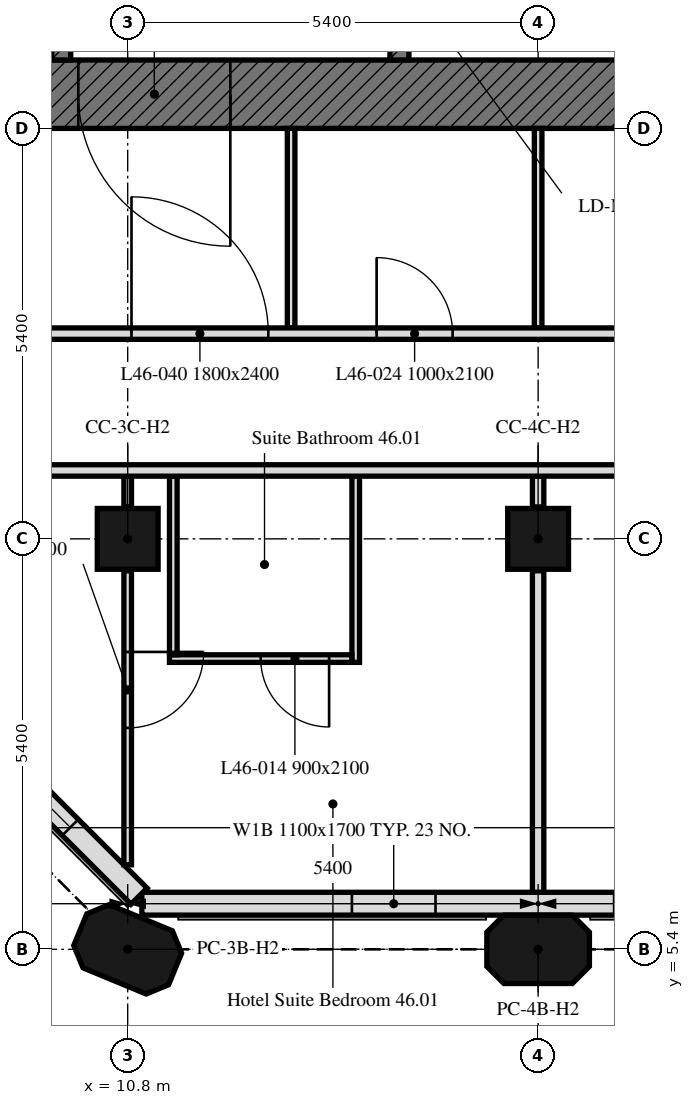
"""IFC4 building model, lengths in metres.
Left out: names, types, materials, properties, quantities, classifications, styles, units other than length and angle.
Written with IfcOpenShell. Run it as: python <this file> out.ifc"""

import sys

from ifc_helpers import new_model, si_unit, direction, frame, frame_2d, origin, origin_2d, place, context, subcontext, project, spatial, polyline, rectangle, outline, extrude, element, fill, save


model = new_model("IFC4")
c1 = context("Model", 3, precision=1e-05, world=origin(), true_north=direction((0.0, 1.0)))
c2 = subcontext(c1, "Body", "Model", "MODEL_VIEW")
j1 = project(units=[si_unit("LENGTHUNIT", "METRE"), si_unit("PLANEANGLEUNIT", "RADIAN")], contexts=[c1])
p1 = place(None, origin())
s1 = spatial("IfcSite", under=j1, at=p1, CompositionType="ELEMENT")
p2 = place(p1, origin())
s2 = spatial("IfcBuilding", under=s1, at=p2, CompositionType="ELEMENT")
p3 = place(p2, frame((0.0, 0.0, 190.6)))
s3 = spatial("IfcBuildingStorey", under=s2, at=p3, CompositionType="ELEMENT", Elevation=190.6)
for number, where, z_axis, x_axis in (
    (1, (10.8, 5.4, 0.0), (0.0, 0.0, 1.0), (-0.924, 0.383, 0.0)),
    (2, (16.2, 5.4, 0.0), (0.0, 0.0, 1.0), (1.0, 0.0, 0.0)),
):
    element("IfcColumn", number, at=place(p3, frame(where, z_axis=z_axis, x_axis=x_axis)), inside=s3, PredefinedType="COLUMN", context=c2, shape_type="SweptSolid", body=[
        extrude(outline(polyline([(-0.45, -0.45), (0.45, -0.45), (0.675, -0.225), (0.675, 0.225), (0.45, 0.45), (-0.45, 0.45), (-0.675, 0.225), (-0.675, -0.225), (-0.45, -0.45)])), origin(), (0.0, 0.0, 1.0), 3.0),
    ])
for number, where, z_axis, x_axis in (
    (3, (10.8, 10.8, 0.0), (0.0, 0.0, 1.0), (1.0, 0.0, 0.0)),
    (4, (16.2, 10.8, 0.0), (0.0, 0.0, 1.0), (1.0, 0.0, 0.0)),
):
    element("IfcColumn", number, at=place(p3, frame(where, z_axis=z_axis, x_axis=x_axis)), inside=s3, PredefinedType="COLUMN", context=c2, shape_type="SweptSolid", body=[
        extrude(rectangle(XDim=0.8, YDim=0.8, at=origin_2d()), origin(), (0.0, 0.0, 1.0), 3.0),
    ])
p4 = place(p3, frame((10.986, 6.0, 0.0), z_axis=(0.0, 0.0, 1.0), x_axis=(1.0, 0.0, 0.0)))
e5 = element("IfcWall", 5, at=p4, inside=s3, PredefinedType="SOLIDWALL", context=c2, shape_type="SweptSolid", body=[
    extrude(rectangle(XDim=32.027, YDim=0.3, at=frame_2d((16.014, 0.0))), origin(), (0.0, 0.0, 1.0), 3.0),
])
p5 = place(p4, frame((2.764, 0.0, 0.9)))
e6 = element("IfcOpeningElement", 6, at=p5, cuts=e5, PredefinedType="OPENING", context=c2, shape_type="SweptSolid", body=[
    extrude(rectangle(XDim=1.1, YDim=1.7, at=frame_2d((0.55, 0.85))), frame((0.0, 0.16, 0.0), z_axis=(0.0, -1.0, 0.0), x_axis=(1.0, 0.0, 0.0)), (0.0, 0.0, 1.0), 0.32),
])
p6 = place(p4, frame((6.214, 0.0, 0.9)))
e7 = element("IfcOpeningElement", 7, at=p6, cuts=e5, PredefinedType="OPENING", context=c2, shape_type="SweptSolid", body=[
    extrude(rectangle(XDim=3.4, YDim=1.7, at=frame_2d((1.7, 0.85))), frame((0.0, 0.16, 0.0), z_axis=(0.0, -1.0, 0.0), x_axis=(1.0, 0.0, 0.0)), (0.0, 0.0, 1.0), 0.32),
])
p7 = place(p4, frame((13.564, 0.0, 0.9)))
e8 = element("IfcOpeningElement", 8, at=p7, cuts=e5, PredefinedType="OPENING", context=c2, shape_type="SweptSolid", body=[
    extrude(rectangle(XDim=1.1, YDim=1.7, at=frame_2d((0.55, 0.85))), frame((0.0, 0.16, 0.0), z_axis=(0.0, -1.0, 0.0), x_axis=(1.0, 0.0, 0.0)), (0.0, 0.0, 1.0), 0.32),
])
p8 = place(p4, frame((17.014, 0.0, 0.9)))
e9 = element("IfcOpeningElement", 9, at=p8, cuts=e5, PredefinedType="OPENING", context=c2, shape_type="SweptSolid", body=[
    extrude(rectangle(XDim=3.4, YDim=1.7, at=frame_2d((1.7, 0.85))), frame((0.0, 0.16, 0.0), z_axis=(0.0, -1.0, 0.0), x_axis=(1.0, 0.0, 0.0)), (0.0, 0.0, 1.0), 0.32),
])
p9 = place(p4, frame((24.364, 0.0, 0.9)))
e10 = element("IfcOpeningElement", 10, at=p9, cuts=e5, PredefinedType="OPENING", context=c2, shape_type="SweptSolid", body=[
    extrude(rectangle(XDim=1.1, YDim=1.7, at=frame_2d((0.55, 0.85))), frame((0.0, 0.16, 0.0), z_axis=(0.0, -1.0, 0.0), x_axis=(1.0, 0.0, 0.0)), (0.0, 0.0, 1.0), 0.32),
])
p10 = place(p4, frame((27.814, 0.0, 0.9)))
e11 = element("IfcOpeningElement", 11, at=p10, cuts=e5, PredefinedType="OPENING", context=c2, shape_type="SweptSolid", body=[
    extrude(rectangle(XDim=3.4, YDim=1.7, at=frame_2d((1.7, 0.85))), frame((0.0, 0.16, 0.0), z_axis=(0.0, -1.0, 0.0), x_axis=(1.0, 0.0, 0.0)), (0.0, 0.0, 1.0), 0.32),
])
p11 = place(p3, frame((6.099, 10.949, 0.0), z_axis=(0.0, 0.0, 1.0), x_axis=(0.707106781187, -0.707106781187, 0.0)))
e12 = element("IfcWall", 12, at=p11, inside=s3, PredefinedType="SOLIDWALL", context=c2, shape_type="SweptSolid", body=[
    extrude(rectangle(XDim=6.86, YDim=0.3, at=frame_2d((3.43, 0.0))), origin(), (0.0, 0.0, 1.0), 3.0),
])
p12 = place(p11, frame((1.28, 0.0, 0.9)))
e13 = element("IfcOpeningElement", 13, at=p12, cuts=e12, PredefinedType="OPENING", context=c2, shape_type="SweptSolid", body=[
    extrude(rectangle(XDim=1.1, YDim=1.7, at=frame_2d((0.55, 0.85))), frame((0.0, 0.16, 0.0), z_axis=(0.0, -1.0, 0.0), x_axis=(1.0, 0.0, 0.0)), (0.0, 0.0, 1.0), 0.32),
])
p13 = place(p11, frame((4.48, 0.0, 0.9)))
e14 = element("IfcOpeningElement", 14, at=p13, cuts=e12, PredefinedType="OPENING", context=c2, shape_type="SweptSolid", body=[
    extrude(rectangle(XDim=1.1, YDim=1.7, at=frame_2d((0.55, 0.85))), frame((0.0, 0.16, 0.0), z_axis=(0.0, -1.0, 0.0), x_axis=(1.0, 0.0, 0.0)), (0.0, 0.0, 1.0), 0.32),
])
p14 = place(p3, frame((17.7, 16.65, 0.0), z_axis=(0.0, 0.0, 1.0), x_axis=(-1.0, 0.0, 0.0)))
e15 = element("IfcWall", 15, at=p14, inside=s3, PredefinedType="SOLIDWALL", context=c2, shape_type="SweptSolid", body=[
    extrude(rectangle(XDim=11.1, YDim=0.9, at=frame_2d((5.55, 0.0))), origin(), (0.0, 0.0, 1.0), 3.0),
])
p15 = place(p14, frame((5.55, 0.0, 0.0)))
e16 = element("IfcOpeningElement", 16, at=p15, cuts=e15, PredefinedType="OPENING", context=c2, shape_type="SweptSolid", body=[
    extrude(rectangle(XDim=2.0, YDim=2.4, at=frame_2d((1.0, 1.2))), frame((0.0, 0.45, 0.0), z_axis=(0.0, -1.0, 0.0), x_axis=(1.0, 0.0, 0.0)), (0.0, 0.0, 1.0), 0.9),
])
p16 = place(p3, frame((9.925, 17.1, 0.0), z_axis=(0.0, 0.0, 1.0), x_axis=(0.0, 1.0, 0.0)))
e17 = element("IfcWall", 17, at=p16, inside=s3, PredefinedType="SOLIDWALL", context=c2, shape_type="SweptSolid", body=[
    extrude(rectangle(XDim=14.4, YDim=0.25, at=frame_2d((7.2, 0.0))), origin(), (0.0, 0.0, 1.0), 3.0),
])
p17 = place(p16, frame((4.6, 0.0, 0.0)))
e18 = element("IfcOpeningElement", 18, at=p17, cuts=e17, PredefinedType="OPENING", context=c2, shape_type="SweptSolid", body=[
    extrude(rectangle(XDim=1.0, YDim=2.1, at=frame_2d((0.5, 1.05))), frame((0.0, 0.125, 0.0), z_axis=(0.0, -1.0, 0.0), x_axis=(1.0, 0.0, 0.0)), (0.0, 0.0, 1.0), 0.25),
])
p18 = place(p16, frame((7.062, 0.0, 0.0)))
e19 = element("IfcOpeningElement", 19, at=p18, cuts=e17, PredefinedType="OPENING", context=c2, shape_type="SweptSolid", body=[
    extrude(rectangle(XDim=1.2, YDim=2.1, at=frame_2d((0.6, 1.05))), frame((0.0, 0.125, 0.0), z_axis=(0.0, -1.0, 0.0), x_axis=(1.0, 0.0, 0.0)), (0.0, 0.0, 1.0), 0.25),
])
p19 = place(p16, frame((9.726, 0.0, 0.0)))
e20 = element("IfcOpeningElement", 20, at=p19, cuts=e17, PredefinedType="OPENING", context=c2, shape_type="SweptSolid", body=[
    extrude(rectangle(XDim=0.9, YDim=2.1, at=frame_2d((0.45, 1.05))), frame((0.0, 0.125, 0.0), z_axis=(0.0, -1.0, 0.0), x_axis=(1.0, 0.0, 0.0)), (0.0, 0.0, 1.0), 0.25),
])
p20 = place(p16, frame((11.539, 0.0, 0.0)))
e21 = element("IfcOpeningElement", 21, at=p20, cuts=e17, PredefinedType="OPENING", context=c2, shape_type="SweptSolid", body=[
    extrude(rectangle(XDim=0.9, YDim=2.1, at=frame_2d((0.45, 1.05))), frame((0.0, 0.125, 0.0), z_axis=(0.0, -1.0, 0.0), x_axis=(1.0, 0.0, 0.0)), (0.0, 0.0, 1.0), 0.25),
])
p21 = place(p16, frame((13.226, 0.0, 0.0)))
e22 = element("IfcOpeningElement", 22, at=p21, cuts=e17, PredefinedType="OPENING", context=c2, shape_type="SweptSolid", body=[
    extrude(rectangle(XDim=0.9, YDim=2.1, at=frame_2d((0.45, 1.05))), frame((0.0, 0.125, 0.0), z_axis=(0.0, -1.0, 0.0), x_axis=(1.0, 0.0, 0.0)), (0.0, 0.0, 1.0), 0.25),
])
p22 = place(p3, frame((14.375, 17.1, 0.0), z_axis=(0.0, 0.0, 1.0), x_axis=(0.0, 1.0, 0.0)))
e23 = element("IfcWall", 23, at=p22, inside=s3, PredefinedType="SOLIDWALL", context=c2, shape_type="SweptSolid", body=[
    extrude(rectangle(XDim=14.4, YDim=0.25, at=frame_2d((7.2, 0.0))), origin(), (0.0, 0.0, 1.0), 3.0),
])
p23 = place(p22, frame((13.15, 0.0, 0.0)))
e24 = element("IfcOpeningElement", 24, at=p23, cuts=e23, PredefinedType="OPENING", context=c2, shape_type="SweptSolid", body=[
    extrude(rectangle(XDim=1.0, YDim=2.1, at=frame_2d((0.5, 1.05))), frame((0.0, 0.125, 0.0), z_axis=(0.0, -1.0, 0.0), x_axis=(1.0, 0.0, 0.0)), (0.0, 0.0, 1.0), 0.25),
])
p24 = place(p22, frame((0.6, 0.0, 0.0)))
e25 = element("IfcOpeningElement", 25, at=p24, cuts=e23, PredefinedType="OPENING", context=c2, shape_type="SweptSolid", body=[
    extrude(rectangle(XDim=1.1, YDim=2.1, at=frame_2d((0.55, 1.05))), frame((0.0, 0.125, 0.0), z_axis=(0.0, -1.0, 0.0), x_axis=(1.0, 0.0, 0.0)), (0.0, 0.0, 1.0), 0.25),
])
p25 = place(p22, frame((3.25, 0.0, 0.0)))
e26 = element("IfcOpeningElement", 26, at=p25, cuts=e23, PredefinedType="OPENING", context=c2, shape_type="SweptSolid", body=[
    extrude(rectangle(XDim=0.9, YDim=2.1, at=frame_2d((0.45, 1.05))), frame((0.0, 0.125, 0.0), z_axis=(0.0, -1.0, 0.0), x_axis=(1.0, 0.0, 0.0)), (0.0, 0.0, 1.0), 0.25),
])
p26 = place(p3, frame((16.2, 6.151, 0.0), z_axis=(0.0, 0.0, 1.0), x_axis=(0.0, 1.0, 0.0)))
e27 = element("IfcWall", 27, at=p26, inside=s3, PredefinedType="PARTITIONING", context=c2, shape_type="SweptSolid", body=[
    extrude(rectangle(XDim=4.229, YDim=0.15, at=frame_2d((2.115, 0.0))), origin(), (0.0, 0.0, 1.0), 3.0),
])
p27 = place(p3, frame((16.2, 11.22, 0.0), z_axis=(0.0, 0.0, 1.0), x_axis=(0.0, 1.0, 0.0)))
e28 = element("IfcWall", 28, at=p27, inside=s3, PredefinedType="PARTITIONING", context=c2, shape_type="SweptSolid", body=[
    extrude(rectangle(XDim=0.405, YDim=0.15, at=frame_2d((0.203, 0.0))), origin(), (0.0, 0.0, 1.0), 3.0),
])
p28 = place(p3, frame((13.8, 11.625, 0.0), z_axis=(0.0, 0.0, 1.0), x_axis=(0.0, -1.0, 0.0)))
e29 = element("IfcWall", 29, at=p28, inside=s3, PredefinedType="PARTITIONING", context=c2, shape_type="SweptSolid", body=[
    extrude(rectangle(XDim=2.45, YDim=0.1, at=frame_2d((1.225, 0.0))), origin(), (0.0, 0.0, 1.0), 3.0),
])
p29 = place(p3, frame((13.75, 9.225, 0.0), z_axis=(0.0, 0.0, 1.0), x_axis=(-1.0, 0.0, 0.0)))
e30 = element("IfcWall", 30, at=p29, inside=s3, PredefinedType="PARTITIONING", context=c2, shape_type="SweptSolid", body=[
    extrude(rectangle(XDim=2.4, YDim=0.1, at=frame_2d((1.2, 0.0))), origin(), (0.0, 0.0, 1.0), 3.0),
])
p30 = place(p29, frame((0.3, 0.0, 0.0)))
e31 = element("IfcOpeningElement", 31, at=p30, cuts=e30, PredefinedType="OPENING", context=c2, shape_type="SweptSolid", body=[
    extrude(rectangle(XDim=0.9, YDim=2.1, at=frame_2d((0.45, 1.05))), frame((0.0, 0.05, 0.0), z_axis=(0.0, -1.0, 0.0), x_axis=(1.0, 0.0, 0.0)), (0.0, 0.0, 1.0), 0.1),
])
p31 = place(p3, frame((11.4, 9.275, 0.0), z_axis=(0.0, 0.0, 1.0), x_axis=(0.0, 1.0, 0.0)))
e32 = element("IfcWall", 32, at=p31, inside=s3, PredefinedType="PARTITIONING", context=c2, shape_type="SweptSolid", body=[
    extrude(rectangle(XDim=2.35, YDim=0.1, at=frame_2d((1.175, 0.0))), origin(), (0.0, 0.0, 1.0), 3.0),
])
p32 = place(p3, frame((10.8, 11.625, 0.0), z_axis=(0.0, 0.0, 1.0), x_axis=(0.0, -1.0, 0.0)))
e33 = element("IfcWall", 33, at=p32, inside=s3, PredefinedType="PARTITIONING", context=c2, shape_type="SweptSolid", body=[
    extrude(rectangle(XDim=0.405, YDim=0.1, at=frame_2d((0.203, 0.0))), origin(), (0.0, 0.0, 1.0), 3.0),
])
p33 = place(p3, frame((10.8, 10.38, 0.0), z_axis=(0.0, 0.0, 1.0), x_axis=(0.0, -1.0, 0.0)))
e34 = element("IfcWall", 34, at=p33, inside=s3, PredefinedType="PARTITIONING", context=c2, shape_type="SweptSolid", body=[
    extrude(rectangle(XDim=3.868, YDim=0.1, at=frame_2d((1.934, 0.0))), origin(), (0.0, 0.0, 1.0), 3.0),
])
p34 = place(p33, frame((1.067, 0.0, 0.0)))
e35 = element("IfcOpeningElement", 35, at=p34, cuts=e34, PredefinedType="OPENING", context=c2, shape_type="SweptSolid", body=[
    extrude(rectangle(XDim=1.0, YDim=2.1, at=frame_2d((0.5, 1.05))), frame((0.0, 0.05, 0.0), z_axis=(0.0, -1.0, 0.0), x_axis=(1.0, 0.0, 0.0)), (0.0, 0.0, 1.0), 0.1),
])
p35 = place(p3, frame((6.151, 11.7, 0.0), z_axis=(0.0, 0.0, 1.0), x_axis=(1.0, 0.0, 0.0)))
e36 = element("IfcWall", 36, at=p35, inside=s3, PredefinedType="PARTITIONING", context=c2, shape_type="SweptSolid", body=[
    extrude(rectangle(XDim=41.698, YDim=0.15, at=frame_2d((20.849, 0.0))), origin(), (0.0, 0.0, 1.0), 3.0),
])
p36 = place(p35, frame((17.649, 0.0, 0.0)))
e37 = element("IfcOpeningElement", 37, at=p36, cuts=e36, PredefinedType="OPENING", context=c2, shape_type="SweptSolid", body=[
    extrude(rectangle(XDim=1.0, YDim=2.1, at=frame_2d((0.5, 1.05))), frame((0.0, 0.075, 0.0), z_axis=(0.0, -1.0, 0.0), x_axis=(1.0, 0.0, 0.0)), (0.0, 0.0, 1.0), 0.15),
])
p37 = place(p35, frame((1.449, 0.0, 0.0)))
e38 = element("IfcOpeningElement", 38, at=p37, cuts=e36, PredefinedType="OPENING", context=c2, shape_type="SweptSolid", body=[
    extrude(rectangle(XDim=1.0, YDim=2.1, at=frame_2d((0.5, 1.05))), frame((0.0, 0.075, 0.0), z_axis=(0.0, -1.0, 0.0), x_axis=(1.0, 0.0, 0.0)), (0.0, 0.0, 1.0), 0.15),
])
p38 = place(p35, frame((29.249, 0.0, 0.0)))
e39 = element("IfcOpeningElement", 39, at=p38, cuts=e36, PredefinedType="OPENING", context=c2, shape_type="SweptSolid", body=[
    extrude(rectangle(XDim=1.0, YDim=2.1, at=frame_2d((0.5, 1.05))), frame((0.0, 0.075, 0.0), z_axis=(0.0, -1.0, 0.0), x_axis=(1.0, 0.0, 0.0)), (0.0, 0.0, 1.0), 0.15),
])
p39 = place(p35, frame((37.954, 0.0, 0.0)))
e40 = element("IfcOpeningElement", 40, at=p39, cuts=e36, PredefinedType="OPENING", context=c2, shape_type="SweptSolid", body=[
    extrude(rectangle(XDim=1.0, YDim=2.1, at=frame_2d((0.5, 1.05))), frame((0.0, 0.075, 0.0), z_axis=(0.0, -1.0, 0.0), x_axis=(1.0, 0.0, 0.0)), (0.0, 0.0, 1.0), 0.15),
])
for number, where, z_axis, x_axis in (
    (41, (16.2, 16.2, 0.0), (0.0, 0.0, 1.0), (0.0, -1.0, 0.0)),
    (42, (12.95, 13.575, 0.0), (0.0, 0.0, 1.0), (0.0, 1.0, 0.0)),
):
    element("IfcWall", number, at=place(p3, frame(where, z_axis=z_axis, x_axis=x_axis)), inside=s3, PredefinedType="PARTITIONING", context=c2, shape_type="SweptSolid", body=[
        extrude(rectangle(XDim=2.625, YDim=0.1, at=frame_2d((1.312, 0.0))), origin(), (0.0, 0.0, 1.0), 3.0),
    ])
p40 = place(p3, frame((9.45, 13.5, 0.0), z_axis=(0.0, 0.0, 1.0), x_axis=(1.0, 0.0, 0.0)))
e43 = element("IfcWall", 43, at=p40, inside=s3, PredefinedType="PARTITIONING", context=c2, shape_type="SweptSolid", body=[
    extrude(rectangle(XDim=33.675, YDim=0.15, at=frame_2d((16.837, 0.0))), origin(), (0.0, 0.0, 1.0), 3.0),
])
p41 = place(p40, frame((8.95, 0.0, 0.0)))
e44 = element("IfcOpeningElement", 44, at=p41, cuts=e43, PredefinedType="OPENING", context=c2, shape_type="SweptSolid", body=[
    extrude(rectangle(XDim=1.0, YDim=2.1, at=frame_2d((0.5, 1.05))), frame((0.0, 0.075, 0.0), z_axis=(0.0, -1.0, 0.0), x_axis=(1.0, 0.0, 0.0)), (0.0, 0.0, 1.0), 0.15),
])
p42 = place(p40, frame((15.517, 0.0, 0.0)))
e45 = element("IfcOpeningElement", 45, at=p42, cuts=e43, PredefinedType="OPENING", context=c2, shape_type="SweptSolid", body=[
    extrude(rectangle(XDim=1.0, YDim=2.1, at=frame_2d((0.5, 1.05))), frame((0.0, 0.075, 0.0), z_axis=(0.0, -1.0, 0.0), x_axis=(1.0, 0.0, 0.0)), (0.0, 0.0, 1.0), 0.15),
])
p43 = place(p40, frame((24.075, 0.0, 0.0)))
e46 = element("IfcOpeningElement", 46, at=p43, cuts=e43, PredefinedType="OPENING", context=c2, shape_type="SweptSolid", body=[
    extrude(rectangle(XDim=1.0, YDim=2.1, at=frame_2d((0.5, 1.05))), frame((0.0, 0.075, 0.0), z_axis=(0.0, -1.0, 0.0), x_axis=(1.0, 0.0, 0.0)), (0.0, 0.0, 1.0), 0.15),
])
p44 = place(p40, frame((31.275, 0.0, 0.0)))
e47 = element("IfcOpeningElement", 47, at=p44, cuts=e43, PredefinedType="OPENING", context=c2, shape_type="SweptSolid", body=[
    extrude(rectangle(XDim=1.0, YDim=2.1, at=frame_2d((0.5, 1.05))), frame((0.0, 0.075, 0.0), z_axis=(0.0, -1.0, 0.0), x_axis=(1.0, 0.0, 0.0)), (0.0, 0.0, 1.0), 0.15),
])
p45 = place(p40, frame((4.625, 0.0, 0.0)))
e48 = element("IfcOpeningElement", 48, at=p45, cuts=e43, PredefinedType="OPENING", context=c2, shape_type="SweptSolid", body=[
    extrude(rectangle(XDim=1.0, YDim=2.1, at=frame_2d((0.5, 1.05))), frame((0.0, 0.075, 0.0), z_axis=(0.0, -1.0, 0.0), x_axis=(1.0, 0.0, 0.0)), (0.0, 0.0, 1.0), 0.15),
])
p46 = place(p40, frame((1.4, 0.0, 0.0)))
e49 = element("IfcOpeningElement", 49, at=p46, cuts=e43, PredefinedType="OPENING", context=c2, shape_type="SweptSolid", body=[
    extrude(rectangle(XDim=1.8, YDim=2.4, at=frame_2d((0.9, 1.2))), frame((0.0, 0.075, 0.0), z_axis=(0.0, -1.0, 0.0), x_axis=(1.0, 0.0, 0.0)), (0.0, 0.0, 1.0), 0.15),
])
p47 = place(p40, frame((26.5, 0.0, 0.0)))
e50 = element("IfcOpeningElement", 50, at=p47, cuts=e43, PredefinedType="OPENING", context=c2, shape_type="SweptSolid", body=[
    extrude(rectangle(XDim=1.8, YDim=2.4, at=frame_2d((0.9, 1.2))), frame((0.0, 0.075, 0.0), z_axis=(0.0, -1.0, 0.0), x_axis=(1.0, 0.0, 0.0)), (0.0, 0.0, 1.0), 0.15),
])
p48 = place(p5, origin())
e51 = element("IfcWindow", 51, at=p48, inside=s3, PartitioningType="SINGLE_PANEL", PredefinedType="WINDOW", context=c2, shape_type="SweptSolid", body=[
    extrude(rectangle(XDim=1.1, YDim=1.7, at=frame_2d((0.55, 0.85))), frame((0.0, 0.03, 0.0), z_axis=(0.0, -1.0, 0.0), x_axis=(1.0, 0.0, 0.0)), (0.0, 0.0, 1.0), 0.06),
])
fill(e6, e51)
p49 = place(p13, origin())
e52 = element("IfcWindow", 52, at=p49, inside=s3, PartitioningType="SINGLE_PANEL", PredefinedType="WINDOW", context=c2, shape_type="SweptSolid", body=[
    extrude(rectangle(XDim=1.1, YDim=1.7, at=frame_2d((0.55, 0.85))), frame((0.0, 0.03, 0.0), z_axis=(0.0, -1.0, 0.0), x_axis=(1.0, 0.0, 0.0)), (0.0, 0.0, 1.0), 0.06),
])
fill(e14, e52)
p50 = place(p15, origin())
e53 = element("IfcDoor", 53, at=p50, inside=s3, OperationType="DOUBLE_DOOR_SINGLE_SWING", PredefinedType="DOOR", context=c2, shape_type="SweptSolid", body=[
    extrude(rectangle(XDim=2.0, YDim=2.4, at=frame_2d((1.0, 1.2))), frame((0.0, 0.025, 0.0), z_axis=(0.0, -1.0, 0.0), x_axis=(1.0, 0.0, 0.0)), (0.0, 0.0, 1.0), 0.05),
])
fill(e16, e53)
p51 = place(p30, origin())
e54 = element("IfcDoor", 54, at=p51, inside=s3, OperationType="SINGLE_SWING_LEFT", PredefinedType="DOOR", context=c2, shape_type="SweptSolid", body=[
    extrude(rectangle(XDim=0.9, YDim=2.1, at=frame_2d((0.45, 1.05))), frame((0.0, 0.025, 0.0), z_axis=(0.0, -1.0, 0.0), x_axis=(1.0, 0.0, 0.0)), (0.0, 0.0, 1.0), 0.05),
])
fill(e31, e54)
p52 = place(p45, origin())
e55 = element("IfcDoor", 55, at=p52, inside=s3, OperationType="SINGLE_SWING_RIGHT", PredefinedType="DOOR", context=c2, shape_type="SweptSolid", body=[
    extrude(rectangle(XDim=1.0, YDim=2.1, at=frame_2d((0.5, 1.05))), frame((0.0, 0.025, 0.0), z_axis=(0.0, -1.0, 0.0), x_axis=(1.0, 0.0, 0.0)), (0.0, 0.0, 1.0), 0.05),
])
fill(e48, e55)
p53 = place(p34, origin())
e56 = element("IfcDoor", 56, at=p53, inside=s3, OperationType="SINGLE_SWING_LEFT", PredefinedType="DOOR", context=c2, shape_type="SweptSolid", body=[
    extrude(rectangle(XDim=1.0, YDim=2.1, at=frame_2d((0.5, 1.05))), frame((0.0, 0.025, 0.0), z_axis=(0.0, -1.0, 0.0), x_axis=(1.0, 0.0, 0.0)), (0.0, 0.0, 1.0), 0.05),
])
fill(e35, e56)
p54 = place(p46, origin())
e57 = element("IfcDoor", 57, at=p54, inside=s3, OperationType="DOUBLE_DOOR_SINGLE_SWING", PredefinedType="DOOR", context=c2, shape_type="SweptSolid", body=[
    extrude(rectangle(XDim=1.8, YDim=2.4, at=frame_2d((0.9, 1.2))), frame((0.0, 0.025, 0.0), z_axis=(0.0, -1.0, 0.0), x_axis=(1.0, 0.0, 0.0)), (0.0, 0.0, 1.0), 0.05),
])
fill(e49, e57)
save(model, sys.argv[1])
